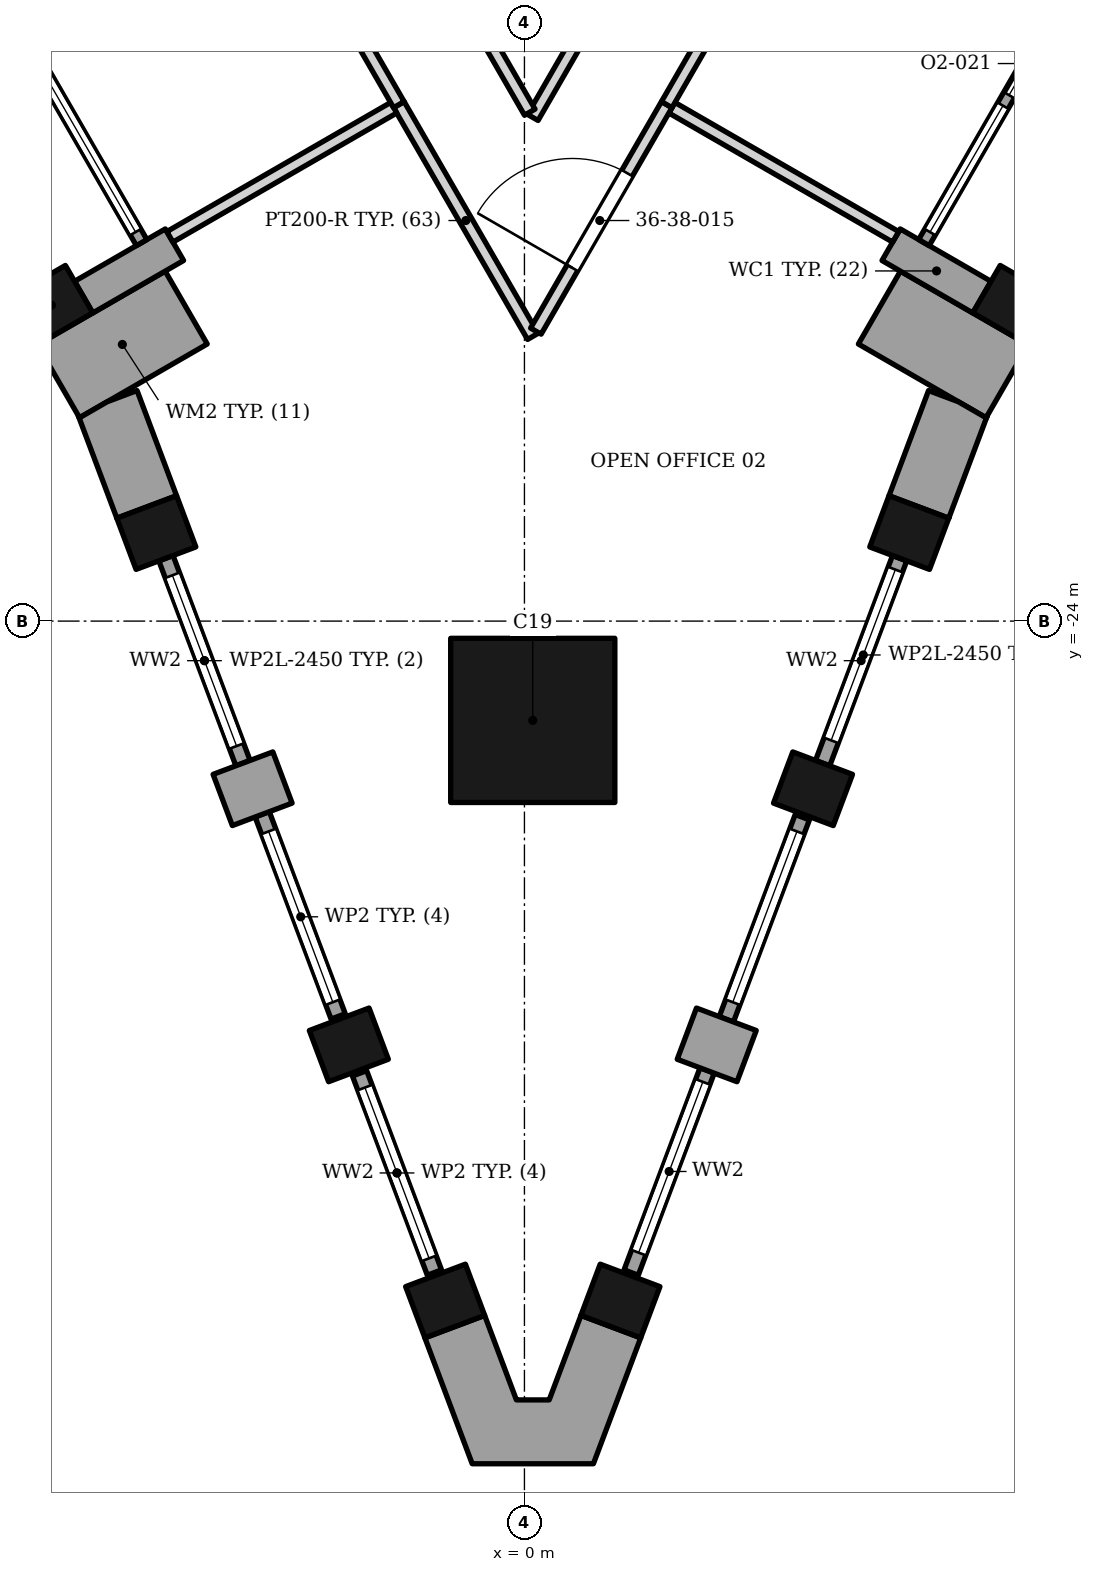
"""IFC4 building model, lengths in metres.
Left out: names, types, materials, properties, quantities, classifications, styles, units other than length and angle.
Written with IfcOpenShell. Run it as: python <this file> out.ifc"""

import sys

from ifc_helpers import new_model, si_unit, direction, frame, frame_2d, origin, origin_2d, place, context, subcontext, project, spatial, polyline, rectangle, outline, extrude, element, fill, save


model = new_model("IFC4")
c1 = context("Model", 3, precision=1e-05, world=origin(), true_north=direction((0.0, 1.0)))
c2 = subcontext(c1, "Body", "Model", "MODEL_VIEW")
j1 = project(units=[si_unit("LENGTHUNIT", "METRE"), si_unit("PLANEANGLEUNIT", "RADIAN")], contexts=[c1])
p1 = place(None, origin())
s1 = spatial("IfcSite", under=j1, at=p1, CompositionType="ELEMENT")
p2 = place(p1, origin())
s2 = spatial("IfcBuilding", under=s1, at=p2, CompositionType="ELEMENT")
p3 = place(p2, frame((0.0, 0.0, 156.3)))
s3 = spatial("IfcBuildingStorey", under=s2, at=p3, CompositionType="ELEMENT", Elevation=156.3)
p4 = place(p3, frame((0.137, -25.633, 0.0), z_axis=(0.0, 0.0, 1.0), x_axis=(0.0, 1.0, 0.0)))
e1 = element("IfcColumn", 1, at=p4, inside=s3, PredefinedType="COLUMN", context=c2, shape_type="SweptSolid", body=[
    extrude(rectangle(XDim=2.7, YDim=2.7, at=origin_2d()), origin(), (0.0, 0.0, 1.0), 3.9),
])
for number, where, z_axis, x_axis in (
    (2, (-7.779, -18.803, 0.0), (0.0, 0.0, 1.0), (0.5, -0.866, 0.0)),
    (3, (-6.054, -22.544, 0.0), (0.0, 0.0, 1.0), (0.352, -0.936, 0.0)),
    (4, (-2.888, -30.969, 0.0), (0.0, 0.0, 1.0), (0.352, -0.936, 0.0)),
    (5, (-1.304, -35.181, 0.0), (0.0, 0.0, 1.0), (0.352, -0.936, 0.0)),
    (6, (1.579, -35.181, 0.0), (0.0, 0.0, 1.0), (0.352, 0.936, 0.0)),
    (7, (4.746, -26.757, 0.0), (0.0, 0.0, 1.0), (0.352, 0.936, 0.0)),
    (8, (6.329, -22.544, 0.0), (0.0, 0.0, 1.0), (0.352, 0.936, 0.0)),
    (9, (8.054, -18.803, 0.0), (0.0, 0.0, 1.0), (0.5, 0.866, 0.0)),
):
    element("IfcColumn", number, at=place(p3, frame(where, z_axis=z_axis, x_axis=x_axis)), inside=s3, PredefinedType="COLUMN", context=c2, shape_type="SweptSolid", body=[
        extrude(rectangle(XDim=0.9, YDim=1.05, at=origin_2d()), origin(), (0.0, 0.0, 1.0), 3.9),
    ])
p5 = place(p3, frame((-5.756, -17.81, 0.0), z_axis=(0.0, 0.0, 1.0), x_axis=(-0.866074815912, -0.499914405916, 0.0)))
e10 = element("IfcWall", 10, at=p5, inside=s3, PredefinedType="SOLIDWALL", context=c2, shape_type="SweptSolid", body=[
    extrude(rectangle(XDim=1.725, YDim=0.6, at=frame_2d((0.862, 0.0))), origin(), (0.0, 0.0, 1.0), 3.0),
])
p6 = place(p3, frame((-8.396, -14.138, 0.0), z_axis=(0.0, 0.0, 1.0), x_axis=(0.500027713859, -0.866009402589, 0.0)))
e11 = element("IfcWall", 11, at=p6, inside=s3, PredefinedType="ELEMENTEDWALL", context=c2, shape_type="SweptSolid", body=[
    extrude(rectangle(XDim=4.2, YDim=0.2, at=frame_2d((2.1, 0.0))), origin(), (0.0, 0.0, 1.0), 3.0),
])
p7 = place(p6, frame((0.2, 0.0, 0.45)))
e12 = element("IfcOpeningElement", 12, at=p7, cuts=e11, PredefinedType="OPENING", context=c2, shape_type="SweptSolid", body=[
    extrude(rectangle(XDim=3.8, YDim=2.25, at=frame_2d((1.9, 1.125))), frame((0.0, 0.11, 0.0), z_axis=(0.0, -1.0, 0.0), x_axis=(1.0, 0.0, 0.0)), (0.0, 0.0, 1.0), 0.22),
])
p8 = place(p3, frame((7.525, -18.673, 0.0), z_axis=(0.0, 0.0, 1.0), x_axis=(-0.866074815912, 0.499914405916, 0.0)))
e13 = element("IfcWall", 13, at=p8, inside=s3, PredefinedType="SOLIDWALL", context=c2, shape_type="SweptSolid", body=[
    extrude(rectangle(XDim=1.725, YDim=0.6, at=frame_2d((0.862, 0.0))), origin(), (0.0, 0.0, 1.0), 3.0),
])
p9 = place(p3, frame((6.57, -17.775, 0.0), z_axis=(0.0, 0.0, 1.0), x_axis=(0.500027713859, 0.866009402589, 0.0)))
e14 = element("IfcWall", 14, at=p9, inside=s3, PredefinedType="ELEMENTEDWALL", context=c2, shape_type="SweptSolid", body=[
    extrude(rectangle(XDim=4.2, YDim=0.2, at=frame_2d((2.1, 0.0))), origin(), (0.0, 0.0, 1.0), 3.0),
])
p10 = place(p9, frame((0.2, 0.0, 0.45)))
e15 = element("IfcOpeningElement", 15, at=p10, cuts=e14, PredefinedType="OPENING", context=c2, shape_type="SweptSolid", body=[
    extrude(rectangle(XDim=2.4, YDim=2.25, at=frame_2d((1.2, 1.125))), frame((0.0, 0.11, 0.0), z_axis=(0.0, -1.0, 0.0), x_axis=(1.0, 0.0, 0.0)), (0.0, 0.0, 1.0), 0.22),
])
p11 = place(p9, frame((2.8, 0.0, 0.0)))
e16 = element("IfcOpeningElement", 16, at=p11, cuts=e14, PredefinedType="OPENING", context=c2, shape_type="SweptSolid", body=[
    extrude(rectangle(XDim=1.2, YDim=2.7, at=frame_2d((0.6, 1.35))), frame((0.0, 0.11, 0.0), z_axis=(0.0, -1.0, 0.0), x_axis=(1.0, 0.0, 0.0)), (0.0, 0.0, 1.0), 0.22),
])
for number, where, z_axis, x_axis in (
    (17, (-5.563, -18.844, 0.0), (0.0, 0.0, 1.0), (-0.866, -0.5, 0.0)),
    (18, (5.838, -18.844, 0.0), (0.0, 0.0, 1.0), (0.866, -0.5, 0.0)),
):
    element("IfcWall", number, at=place(p3, frame(where, z_axis=z_axis, x_axis=x_axis)), inside=s3, PredefinedType="SOLIDWALL", context=c2, shape_type="SweptSolid", body=[
        extrude(rectangle(XDim=2.425, YDim=1.384, at=frame_2d((1.212, 0.0))), origin(), (0.0, 0.0, 1.0), 3.0),
    ])
p12 = place(p3, frame((-3.979, -26.572, 0.0), z_axis=(0.0, 0.0, 1.0), x_axis=(-0.936080509118, -0.351785844584, 0.0)))
e19 = element("IfcWall", 19, at=p12, inside=s3, PredefinedType="SOLIDWALL", context=c2, shape_type="SweptSolid", body=[
    extrude(rectangle(XDim=1.05, YDim=0.9, at=frame_2d((0.525, 0.0))), origin(), (0.0, 0.0, 1.0), 3.0),
])
p13 = place(p3, frame((-5.896, -22.966, 0.0), z_axis=(0.0, 0.0, 1.0), x_axis=(0.351851706772, -0.936055754986, 0.0)))
e20 = element("IfcWall", 20, at=p13, inside=s3, PredefinedType="ELEMENTEDWALL", context=c2, shape_type="SweptSolid", body=[
    extrude(rectangle(XDim=3.6, YDim=0.25, at=frame_2d((1.8, 0.0))), origin(), (0.0, 0.0, 1.0), 2.95),
])
p14 = place(p13, frame((0.3, 0.0, 0.3)))
e21 = element("IfcOpeningElement", 21, at=p14, cuts=e20, PredefinedType="OPENING", context=c2, shape_type="SweptSolid", body=[
    extrude(rectangle(XDim=3.0, YDim=2.45, at=frame_2d((1.5, 1.225))), frame((0.0, 0.135, 0.0), z_axis=(0.0, -1.0, 0.0), x_axis=(1.0, 0.0, 0.0)), (0.0, 0.0, 1.0), 0.27),
])
p15 = place(p3, frame((-4.313, -27.176, 0.0), z_axis=(0.0, 0.0, 1.0), x_axis=(0.351838904667, -0.936060567037, 0.0)))
e22 = element("IfcWall", 22, at=p15, inside=s3, PredefinedType="ELEMENTEDWALL", context=c2, shape_type="SweptSolid", body=[
    extrude(rectangle(XDim=3.552, YDim=0.25, at=frame_2d((1.776, 0.0))), origin(), (0.0, 0.0, 1.0), 3.0),
])
p16 = place(p15, frame((0.302, 0.0, 0.3)))
e23 = element("IfcOpeningElement", 23, at=p16, cuts=e22, PredefinedType="OPENING", context=c2, shape_type="SweptSolid", body=[
    extrude(rectangle(XDim=3.0, YDim=2.5, at=frame_2d((1.5, 1.25))), frame((0.0, 0.135, 0.0), z_axis=(0.0, -1.0, 0.0), x_axis=(1.0, 0.0, 0.0)), (0.0, 0.0, 1.0), 0.27),
])
p17 = place(p3, frame((-2.712, -31.437, 0.0), z_axis=(0.0, 0.0, 1.0), x_axis=(0.351826590602, -0.936065195457, 0.0)))
e24 = element("IfcWall", 24, at=p17, inside=s3, PredefinedType="ELEMENTEDWALL", context=c2, shape_type="SweptSolid", body=[
    extrude(rectangle(XDim=3.5, YDim=0.25, at=frame_2d((1.75, 0.0))), origin(), (0.0, 0.0, 1.0), 3.0),
])
p18 = place(p17, frame((0.25, 0.0, 0.3)))
e25 = element("IfcOpeningElement", 25, at=p18, cuts=e24, PredefinedType="OPENING", context=c2, shape_type="SweptSolid", body=[
    extrude(rectangle(XDim=3.0, YDim=2.5, at=frame_2d((1.5, 1.25))), frame((0.0, 0.135, 0.0), z_axis=(0.0, -1.0, 0.0), x_axis=(1.0, 0.0, 0.0)), (0.0, 0.0, 1.0), 0.27),
])
p19 = place(p3, frame((3.654, -31.154, 0.0), z_axis=(0.0, 0.0, 1.0), x_axis=(-0.936080509118, 0.351785844584, 0.0)))
e26 = element("IfcWall", 26, at=p19, inside=s3, PredefinedType="SOLIDWALL", context=c2, shape_type="SweptSolid", body=[
    extrude(rectangle(XDim=1.05, YDim=0.9, at=frame_2d((0.525, 0.0))), origin(), (0.0, 0.0, 1.0), 3.0),
])
p20 = place(p3, frame((1.755, -34.713, 0.0), z_axis=(0.0, 0.0, 1.0), x_axis=(0.351838904667, 0.936060567037, 0.0)))
e27 = element("IfcWall", 27, at=p20, inside=s3, PredefinedType="ELEMENTEDWALL", context=c2, shape_type="SweptSolid", body=[
    extrude(rectangle(XDim=3.552, YDim=0.25, at=frame_2d((1.776, 0.0))), origin(), (0.0, 0.0, 1.0), 3.0),
])
p21 = place(p20, frame((0.35, 0.0, 0.3)))
e28 = element("IfcOpeningElement", 28, at=p21, cuts=e27, PredefinedType="OPENING", context=c2, shape_type="SweptSolid", body=[
    extrude(rectangle(XDim=3.0, YDim=2.5, at=frame_2d((1.5, 1.25))), frame((0.0, 0.135, 0.0), z_axis=(0.0, -1.0, 0.0), x_axis=(1.0, 0.0, 0.0)), (0.0, 0.0, 1.0), 0.27),
])
p22 = place(p3, frame((3.32, -30.55, 0.0), z_axis=(0.0, 0.0, 1.0), x_axis=(0.351838904667, 0.936060567037, 0.0)))
e29 = element("IfcWall", 29, at=p22, inside=s3, PredefinedType="ELEMENTEDWALL", context=c2, shape_type="SweptSolid", body=[
    extrude(rectangle(XDim=3.552, YDim=0.25, at=frame_2d((1.776, 0.0))), origin(), (0.0, 0.0, 1.0), 3.0),
])
p23 = place(p22, frame((0.302, 0.0, 0.3)))
e30 = element("IfcOpeningElement", 30, at=p23, cuts=e29, PredefinedType="OPENING", context=c2, shape_type="SweptSolid", body=[
    extrude(rectangle(XDim=3.0, YDim=2.5, at=frame_2d((1.5, 1.25))), frame((0.0, 0.135, 0.0), z_axis=(0.0, -1.0, 0.0), x_axis=(1.0, 0.0, 0.0)), (0.0, 0.0, 1.0), 0.27),
])
p24 = place(p3, frame((4.904, -26.335, 0.0), z_axis=(0.0, 0.0, 1.0), x_axis=(0.351851706772, 0.936055754986, 0.0)))
e31 = element("IfcWall", 31, at=p24, inside=s3, PredefinedType="ELEMENTEDWALL", context=c2, shape_type="SweptSolid", body=[
    extrude(rectangle(XDim=3.6, YDim=0.25, at=frame_2d((1.8, 0.0))), origin(), (0.0, 0.0, 1.0), 2.95),
])
p25 = place(p24, frame((0.4, 0.0, 0.3)))
e32 = element("IfcOpeningElement", 32, at=p25, cuts=e31, PredefinedType="OPENING", context=c2, shape_type="SweptSolid", body=[
    extrude(rectangle(XDim=3.0, YDim=2.45, at=frame_2d((1.5, 1.225))), frame((0.0, 0.135, 0.0), z_axis=(0.0, -1.0, 0.0), x_axis=(1.0, 0.0, 0.0)), (0.0, 0.0, 1.0), 0.27),
])
p26 = place(p3, origin())
e33 = element("IfcWall", 33, at=p26, inside=s3, PredefinedType="SOLIDWALL", context=c2, shape_type="SweptSolid", body=[
    extrude(outline(polyline([(-5.721, -21.938), (-6.371, -20.208), (-6.863, -20.393), (-7.317, -20.656), (-7.339, -20.618), (-6.704, -22.308), (-6.704, -22.308), (-6.704, -22.307), (-5.721, -21.938)])), origin(), (0.0, 0.0, 1.0), 3.0),
])
p27 = place(p3, origin())
e34 = element("IfcWall", 34, at=p27, inside=s3, PredefinedType="SOLIDWALL", context=c2, shape_type="SweptSolid", body=[
    extrude(outline(polyline([(-0.132, -36.808), (-0.655, -35.418), (-1.637, -35.787), (-0.859, -37.858), (1.134, -37.858), (1.912, -35.787), (0.929, -35.418), (0.407, -36.808), (-0.132, -36.808)])), origin(), (0.0, 0.0, 1.0), 3.0),
])
p28 = place(p3, origin())
e35 = element("IfcWall", 35, at=p28, inside=s3, PredefinedType="SOLIDWALL", context=c2, shape_type="SweptSolid", body=[
    extrude(outline(polyline([(6.979, -22.307), (6.979, -22.308), (6.979, -22.308), (7.614, -20.618), (7.592, -20.656), (7.137, -20.393), (6.646, -20.208), (5.996, -21.938), (6.979, -22.307)])), origin(), (0.0, 0.0, 1.0), 3.0),
])
p29 = place(p3, frame((-2.065, -15.507, 0.0), z_axis=(0.0, 0.0, 1.0), x_axis=(0.500349665943, -0.865823429916, 0.0)))
e36 = element("IfcWall", 36, at=p29, inside=s3, PredefinedType="PARTITIONING", context=c2, shape_type="SweptSolid", body=[
    extrude(rectangle(XDim=4.402, YDim=0.2, at=frame_2d((2.201, 0.0))), origin(), (0.0, 0.0, 1.0), 3.128),
])
p30 = place(p3, frame((2.425, -15.557, 0.0), z_axis=(0.0, 0.0, 1.0), x_axis=(0.866217148336, -0.499667741532, 0.0)))
e37 = element("IfcWall", 37, at=p30, inside=s3, PredefinedType="PARTITIONING", context=c2, shape_type="SweptSolid", body=[
    extrude(rectangle(XDim=4.25, YDim=0.2, at=frame_2d((2.125, 0.0))), origin(), (0.0, 0.0, 1.0), 3.052),
])
p31 = place(p3, frame((0.137, -15.717, 0.0), z_axis=(0.0, 0.0, 1.0), x_axis=(0.499742818956, 0.866173836422, 0.0)))
e38 = element("IfcWall", 38, at=p31, inside=s3, PredefinedType="PARTITIONING", context=c2, shape_type="SweptSolid", body=[
    extrude(rectangle(XDim=6.573, YDim=0.2, at=frame_2d((3.286, 0.0))), origin(), (0.0, 0.0, 1.0), 2.884),
])
p32 = place(p31, frame((3.238, 0.0, 0.0)))
e39 = element("IfcOpeningElement", 39, at=p32, cuts=e38, PredefinedType="OPENING", context=c2, shape_type="SweptSolid", body=[
    extrude(rectangle(XDim=0.9, YDim=2.1, at=frame_2d((0.45, 1.05))), frame((0.0, 0.11, 0.0), z_axis=(0.0, -1.0, 0.0), x_axis=(1.0, 0.0, 0.0)), (0.0, 0.0, 1.0), 0.22),
])
p33 = place(p3, frame((-5.831, -17.681, 0.0), z_axis=(0.0, 0.0, 1.0), x_axis=(0.866217148336, 0.499667741532, 0.0)))
e40 = element("IfcWall", 40, at=p33, inside=s3, PredefinedType="PARTITIONING", context=c2, shape_type="SweptSolid", body=[
    extrude(rectangle(XDim=4.25, YDim=0.2, at=frame_2d((2.125, 0.0))), origin(), (0.0, 0.0, 1.0), 3.052),
])
p34 = place(p3, frame((-11.065, 0.082, 0.0), z_axis=(0.0, 0.0, 1.0), x_axis=(0.499996012009, -0.86602770624, 0.0)))
e41 = element("IfcWall", 41, at=p34, inside=s3, PredefinedType="PARTITIONING", context=c2, shape_type="SweptSolid", body=[
    extrude(rectangle(XDim=18.0, YDim=0.2, at=frame_2d((9.0, 0.0))), origin(), (0.0, 0.0, 1.0), 2.884),
])
p35 = place(p34, frame((4.0, 0.0, 0.0)))
e42 = element("IfcOpeningElement", 42, at=p35, cuts=e41, PredefinedType="OPENING", context=c2, shape_type="SweptSolid", body=[
    extrude(rectangle(XDim=1.0, YDim=2.1, at=frame_2d((0.5, 1.05))), frame((0.0, 0.11, 0.0), z_axis=(0.0, -1.0, 0.0), x_axis=(1.0, 0.0, 0.0)), (0.0, 0.0, 1.0), 0.22),
])
p36 = place(p34, frame((13.0, 0.0, 0.0)))
e43 = element("IfcOpeningElement", 43, at=p36, cuts=e41, PredefinedType="OPENING", context=c2, shape_type="SweptSolid", body=[
    extrude(rectangle(XDim=1.0, YDim=2.4, at=frame_2d((0.5, 1.2))), frame((0.0, 0.11, 0.0), z_axis=(0.0, -1.0, 0.0), x_axis=(1.0, 0.0, 0.0)), (0.0, 0.0, 1.0), 0.22),
])
p37 = place(p3, frame((0.188, -19.231, 0.0), z_axis=(0.0, 0.0, 1.0), x_axis=(0.500313526201, 0.865844313662, 0.0)))
e44 = element("IfcWall", 44, at=p37, inside=s3, PredefinedType="PARTITIONING", context=c2, shape_type="SweptSolid", body=[
    extrude(rectangle(XDim=4.302, YDim=0.2, at=frame_2d((2.151, 0.0))), origin(), (0.0, 0.0, 1.0), 3.128),
])
p38 = place(p37, frame((1.201, 0.0, 0.0)))
e45 = element("IfcOpeningElement", 45, at=p38, cuts=e44, PredefinedType="OPENING", context=c2, shape_type="SweptSolid", body=[
    extrude(rectangle(XDim=1.8, YDim=2.4, at=frame_2d((0.9, 1.2))), frame((0.0, 0.11, 0.0), z_axis=(0.0, -1.0, 0.0), x_axis=(1.0, 0.0, 0.0)), (0.0, 0.0, 1.0), 0.22),
])
p39 = place(p3, frame((-1.333, -13.169, 0.0), z_axis=(0.0, 0.0, 1.0), x_axis=(0.499982728352, -0.866035375346, 0.0)))
e46 = element("IfcWall", 46, at=p39, inside=s3, PredefinedType="PARTITIONING", context=c2, shape_type="SweptSolid", body=[
    extrude(rectangle(XDim=2.842, YDim=0.2, at=frame_2d((1.421, 0.0))), origin(), (0.0, 0.0, 1.0), 3.128),
])
p40 = place(p3, frame((2.34, -15.506, 0.0), z_axis=(0.0, 0.0, 1.0), x_axis=(0.5000018851, 0.866024315419, 0.0)))
e47 = element("IfcWall", 47, at=p40, inside=s3, PredefinedType="PARTITIONING", context=c2, shape_type="SweptSolid", body=[
    extrude(rectangle(XDim=9.0, YDim=0.2, at=frame_2d((4.5, 0.0))), origin(), (0.0, 0.0, 1.0), 2.884),
])
p41 = place(p40, frame((4.0, 0.0, 0.0)))
e48 = element("IfcOpeningElement", 48, at=p41, cuts=e47, PredefinedType="OPENING", context=c2, shape_type="SweptSolid", body=[
    extrude(rectangle(XDim=1.0, YDim=2.1, at=frame_2d((0.5, 1.05))), frame((0.0, 0.11, 0.0), z_axis=(0.0, -1.0, 0.0), x_axis=(1.0, 0.0, 0.0)), (0.0, 0.0, 1.0), 0.22),
])
p42 = place(p7, origin())
e49 = element("IfcWindow", 49, at=p42, inside=s3, PartitioningType="SINGLE_PANEL", PredefinedType="WINDOW", context=c2, shape_type="SweptSolid", body=[
    extrude(rectangle(XDim=3.8, YDim=2.25, at=frame_2d((1.9, 1.125))), frame((0.0, 0.03, 0.0), z_axis=(0.0, -1.0, 0.0), x_axis=(1.0, 0.0, 0.0)), (0.0, 0.0, 1.0), 0.06),
])
fill(e12, e49)
p43 = place(p10, origin())
e50 = element("IfcWindow", 50, at=p43, inside=s3, PartitioningType="SINGLE_PANEL", PredefinedType="WINDOW", context=c2, shape_type="SweptSolid", body=[
    extrude(rectangle(XDim=2.4, YDim=2.25, at=frame_2d((1.2, 1.125))), frame((0.0, 0.03, 0.0), z_axis=(0.0, -1.0, 0.0), x_axis=(1.0, 0.0, 0.0)), (0.0, 0.0, 1.0), 0.06),
])
fill(e15, e50)
p44 = place(p11, origin())
e51 = element("IfcDoor", 51, at=p44, inside=s3, OperationType="SINGLE_SWING_LEFT", PredefinedType="DOOR", context=c2, shape_type="SweptSolid", body=[
    extrude(rectangle(XDim=1.2, YDim=2.7, at=frame_2d((0.6, 1.35))), frame((0.0, 0.025, 0.0), z_axis=(0.0, -1.0, 0.0), x_axis=(1.0, 0.0, 0.0)), (0.0, 0.0, 1.0), 0.05),
])
fill(e16, e51)
p45 = place(p14, origin())
e52 = element("IfcWindow", 52, at=p45, inside=s3, PartitioningType="SINGLE_PANEL", PredefinedType="WINDOW", context=c2, shape_type="SweptSolid", body=[
    extrude(rectangle(XDim=3.0, YDim=2.45, at=frame_2d((1.5, 1.225))), frame((0.0, 0.03, 0.0), z_axis=(0.0, -1.0, 0.0), x_axis=(1.0, 0.0, 0.0)), (0.0, 0.0, 1.0), 0.06),
])
fill(e21, e52)
p46 = place(p16, origin())
e53 = element("IfcWindow", 53, at=p46, inside=s3, PartitioningType="SINGLE_PANEL", PredefinedType="WINDOW", context=c2, shape_type="SweptSolid", body=[
    extrude(rectangle(XDim=3.0, YDim=2.5, at=frame_2d((1.5, 1.25))), frame((0.0, 0.03, 0.0), z_axis=(0.0, -1.0, 0.0), x_axis=(1.0, 0.0, 0.0)), (0.0, 0.0, 1.0), 0.06),
])
fill(e23, e53)
p47 = place(p18, origin())
e54 = element("IfcWindow", 54, at=p47, inside=s3, PartitioningType="SINGLE_PANEL", PredefinedType="WINDOW", context=c2, shape_type="SweptSolid", body=[
    extrude(rectangle(XDim=3.0, YDim=2.5, at=frame_2d((1.5, 1.25))), frame((0.0, 0.03, 0.0), z_axis=(0.0, -1.0, 0.0), x_axis=(1.0, 0.0, 0.0)), (0.0, 0.0, 1.0), 0.06),
])
fill(e25, e54)
p48 = place(p21, origin())
e55 = element("IfcWindow", 55, at=p48, inside=s3, PartitioningType="SINGLE_PANEL", PredefinedType="WINDOW", context=c2, shape_type="SweptSolid", body=[
    extrude(rectangle(XDim=3.0, YDim=2.5, at=frame_2d((1.5, 1.25))), frame((0.0, 0.03, 0.0), z_axis=(0.0, -1.0, 0.0), x_axis=(1.0, 0.0, 0.0)), (0.0, 0.0, 1.0), 0.06),
])
fill(e28, e55)
p49 = place(p23, origin())
e56 = element("IfcWindow", 56, at=p49, inside=s3, PartitioningType="SINGLE_PANEL", PredefinedType="WINDOW", context=c2, shape_type="SweptSolid", body=[
    extrude(rectangle(XDim=3.0, YDim=2.5, at=frame_2d((1.5, 1.25))), frame((0.0, 0.03, 0.0), z_axis=(0.0, -1.0, 0.0), x_axis=(1.0, 0.0, 0.0)), (0.0, 0.0, 1.0), 0.06),
])
fill(e30, e56)
p50 = place(p25, origin())
e57 = element("IfcWindow", 57, at=p50, inside=s3, PartitioningType="SINGLE_PANEL", PredefinedType="WINDOW", context=c2, shape_type="SweptSolid", body=[
    extrude(rectangle(XDim=3.0, YDim=2.45, at=frame_2d((1.5, 1.225))), frame((0.0, 0.03, 0.0), z_axis=(0.0, -1.0, 0.0), x_axis=(1.0, 0.0, 0.0)), (0.0, 0.0, 1.0), 0.06),
])
fill(e32, e57)
p51 = place(p38, origin())
e58 = element("IfcDoor", 58, at=p51, inside=s3, OperationType="DOUBLE_DOOR_SINGLE_SWING", PredefinedType="DOOR", context=c2, shape_type="SweptSolid", body=[
    extrude(rectangle(XDim=1.8, YDim=2.4, at=frame_2d((0.9, 1.2))), frame((0.0, 0.025, 0.0), z_axis=(0.0, -1.0, 0.0), x_axis=(1.0, 0.0, 0.0)), (0.0, 0.0, 1.0), 0.05),
])
fill(e45, e58)
save(model, sys.argv[1])
